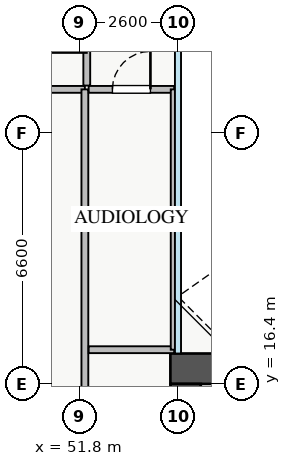
"""IFC4 building model, lengths in metres.
Left out: names, types, materials, properties, quantities, classifications, styles, units other than length and angle.
Written with IfcOpenShell. Run it as: python <this file> out.ifc"""

import sys

from ifc_helpers import new_model, si_unit, direction, frame, frame_2d, origin, place, context, subcontext, project, spatial, rectangle, extrude, source, transform, mapped, element, fill, save


model = new_model("IFC4")
c1 = context("Model", 3, precision=1e-05, world=origin(), true_north=direction((0.0, 1.0)))
c2 = subcontext(c1, "Body", "Model", "MODEL_VIEW")
j1 = project(units=[si_unit("LENGTHUNIT", "METRE"), si_unit("PLANEANGLEUNIT", "RADIAN")], contexts=[c1])
p1 = place(None, origin())
s1 = spatial("IfcSite", under=j1, at=p1, CompositionType="ELEMENT")
p2 = place(p1, origin())
s2 = spatial("IfcBuilding", under=s1, at=p2, CompositionType="ELEMENT")
p3 = place(p2, frame((0.0, 0.0, 18.2)))
s3 = spatial("IfcBuildingStorey", under=s2, at=p3, CompositionType="ELEMENT", Elevation=18.2)
p4 = place(p3, frame((54.2, 16.8, 0.0), z_axis=(0.0, 0.0, 1.0), x_axis=(1.0, 0.0, 0.0)))
e1 = element("IfcWall", 1, at=p4, inside=s3, PredefinedType="SHEAR", context=c2, shape_type="SweptSolid", body=[
    extrude(rectangle(XDim=12.6, YDim=0.8, at=frame_2d((6.3, 0.0))), origin(), (0.0, 0.0, 1.0), 4.8),
])
p5 = place(p3, frame((54.6, 12.85, 0.0), z_axis=(0.0, 0.0, 1.0), x_axis=(0.0, 1.0, 0.0)))
e2 = element("IfcWall", 2, at=p5, inside=s3, PredefinedType="SHEAR", context=c2, shape_type="SweptSolid", body=[
    extrude(rectangle(XDim=3.55, YDim=0.8, at=frame_2d((1.775, 0.0))), origin(), (0.0, 0.0, 1.0), 4.8),
])
p6 = place(p5, frame((0.95, 0.0, 0.0)))
e3 = element("IfcOpeningElement", 3, at=p6, cuts=e2, PredefinedType="OPENING", context=c2, shape_type="SweptSolid", body=[
    extrude(rectangle(XDim=1.1, YDim=2.05, at=frame_2d((0.55, 1.025))), frame((0.0, 0.41, 0.0), z_axis=(0.0, -1.0, 0.0), x_axis=(1.0, 0.0, 0.0)), (0.0, 0.0, 1.0), 0.82),
])
p7 = place(p3, frame((52.0, 24.25, 0.0), z_axis=(0.0, 0.0, 1.0), x_axis=(0.0, 1.0, 0.0)))
e4 = element("IfcWall", 4, at=p7, inside=s3, PredefinedType="PARTITIONING", context=c2, shape_type="SweptSolid", body=[
    extrude(rectangle(XDim=11.55, YDim=0.18, at=frame_2d((5.775, 0.0))), origin(), (0.0, 0.0, 1.0), 4.62),
])
p8 = place(p7, frame((2.325, 0.0, 0.0)))
e5 = element("IfcOpeningElement", 5, at=p8, cuts=e4, PredefinedType="OPENING", context=c2, shape_type="SweptSolid", body=[
    extrude(rectangle(XDim=0.85, YDim=2.05, at=frame_2d((0.425, 1.025))), frame((0.0, 0.1, 0.0), z_axis=(0.0, -1.0, 0.0), x_axis=(1.0, 0.0, 0.0)), (0.0, 0.0, 1.0), 0.2),
])
p9 = place(p7, frame((5.93, 0.0, 0.0)))
e6 = element("IfcOpeningElement", 6, at=p9, cuts=e4, PredefinedType="OPENING", context=c2, shape_type="SweptSolid", body=[
    extrude(rectangle(XDim=0.85, YDim=2.05, at=frame_2d((0.425, 1.025))), frame((0.0, 0.1, 0.0), z_axis=(0.0, -1.0, 0.0), x_axis=(1.0, 0.0, 0.0)), (0.0, 0.0, 1.0), 0.2),
])
p10 = place(p7, frame((9.43, 0.0, 0.0)))
e7 = element("IfcOpeningElement", 7, at=p10, cuts=e4, PredefinedType="OPENING", context=c2, shape_type="SweptSolid", body=[
    extrude(rectangle(XDim=0.85, YDim=2.05, at=frame_2d((0.425, 1.025))), frame((0.0, 0.1, 0.0), z_axis=(0.0, -1.0, 0.0), x_axis=(1.0, 0.0, 0.0)), (0.0, 0.0, 1.0), 0.2),
])
p11 = place(p3, frame((46.8, 25.2, 0.0), z_axis=(0.0, 0.0, 1.0), x_axis=(1.0, 0.0, 0.0)))
e8 = element("IfcWall", 8, at=p11, inside=s3, PredefinedType="PARTITIONING", context=c2, shape_type="SweptSolid", body=[
    extrude(rectangle(XDim=5.2, YDim=0.18, at=frame_2d((2.6, 0.0))), origin(), (0.0, 0.0, 1.0), 4.62),
])
p12 = place(p3, frame((44.0, 24.15, 0.0), z_axis=(0.0, 0.0, 1.0), x_axis=(1.0, 0.0, 0.0)))
e9 = element("IfcWall", 9, at=p12, inside=s3, PredefinedType="PARTITIONING", context=c2, shape_type="SweptSolid", body=[
    extrude(rectangle(XDim=7.95, YDim=0.18, at=frame_2d((3.975, 0.0))), origin(), (0.0, 0.0, 1.0), 4.62),
])
p13 = place(p3, frame((51.95, 9.8, 0.0), z_axis=(0.0, 0.0, 1.0), x_axis=(0.0, 1.0, 0.0)))
e10 = element("IfcWall", 10, at=p13, inside=s3, PredefinedType="PARTITIONING", context=c2, shape_type="SweptSolid", body=[
    extrude(rectangle(XDim=14.35, YDim=0.18, at=frame_2d((7.175, 0.0))), origin(), (0.0, 0.0, 1.0), 4.62),
])
p14 = place(p3, frame((52.05, 17.3, 0.0), z_axis=(0.0, 0.0, 1.0), x_axis=(1.0, 0.0, 0.0)))
e11 = element("IfcWall", 11, at=p14, inside=s3, PredefinedType="PARTITIONING", context=c2, shape_type="SweptSolid", body=[
    extrude(rectangle(XDim=2.25, YDim=0.18, at=frame_2d((1.125, 0.0))), origin(), (0.0, 0.0, 1.0), 4.62),
])
p15 = place(p3, frame((52.05, 24.15, 0.0), z_axis=(0.0, 0.0, 1.0), x_axis=(1.0, 0.0, 0.0)))
e12 = element("IfcWall", 12, at=p15, inside=s3, PredefinedType="PARTITIONING", context=c2, shape_type="SweptSolid", body=[
    extrude(rectangle(XDim=2.25, YDim=0.18, at=frame_2d((1.125, 0.0))), origin(), (0.0, 0.0, 1.0), 4.62),
])
p16 = place(p15, frame((0.625, 0.0, 0.0)))
e13 = element("IfcOpeningElement", 13, at=p16, cuts=e12, PredefinedType="OPENING", context=c2, shape_type="SweptSolid", body=[
    extrude(rectangle(XDim=1.0, YDim=2.05, at=frame_2d((0.5, 1.025))), frame((0.0, 0.1, 0.0), z_axis=(0.0, -1.0, 0.0), x_axis=(1.0, 0.0, 0.0)), (0.0, 0.0, 1.0), 0.2),
])
p17 = place(p3, frame((54.3, 17.3, 0.0), z_axis=(0.0, 0.0, 1.0), x_axis=(0.0, 1.0, 0.0)))
e14 = element("IfcWall", 14, at=p17, inside=s3, PredefinedType="PARTITIONING", context=c2, shape_type="SweptSolid", body=[
    extrude(rectangle(XDim=6.85, YDim=0.18, at=frame_2d((3.425, 0.0))), origin(), (0.0, 0.0, 1.0), 4.62),
])
m1 = source(origin(), c2, "Body", "SweptSolid", [
    extrude(rectangle(XDim=1.0, YDim=2.05, at=frame_2d((0.5, 1.025))), frame((0.0, 0.025, 0.0), z_axis=(0.0, -1.0, 0.0), x_axis=(1.0, 0.0, 0.0)), (0.0, 0.0, 1.0), 0.05),
])
p18 = place(p16, origin())
e15 = element("IfcDoor", 15, at=p18, inside=s3, OperationType="SINGLE_SWING_RIGHT", PredefinedType="DOOR", context=c2, shape_type="MappedRepresentation", body=[
    mapped(m1, transform((0.0, 0.0, 0.0), x_axis=(1.0, 0.0, 0.0), y_axis=(0.0, 1.0, 0.0), z_axis=(0.0, 0.0, 1.0), scale=1.0)),
])
fill(e13, e15)
save(model, sys.argv[1])
